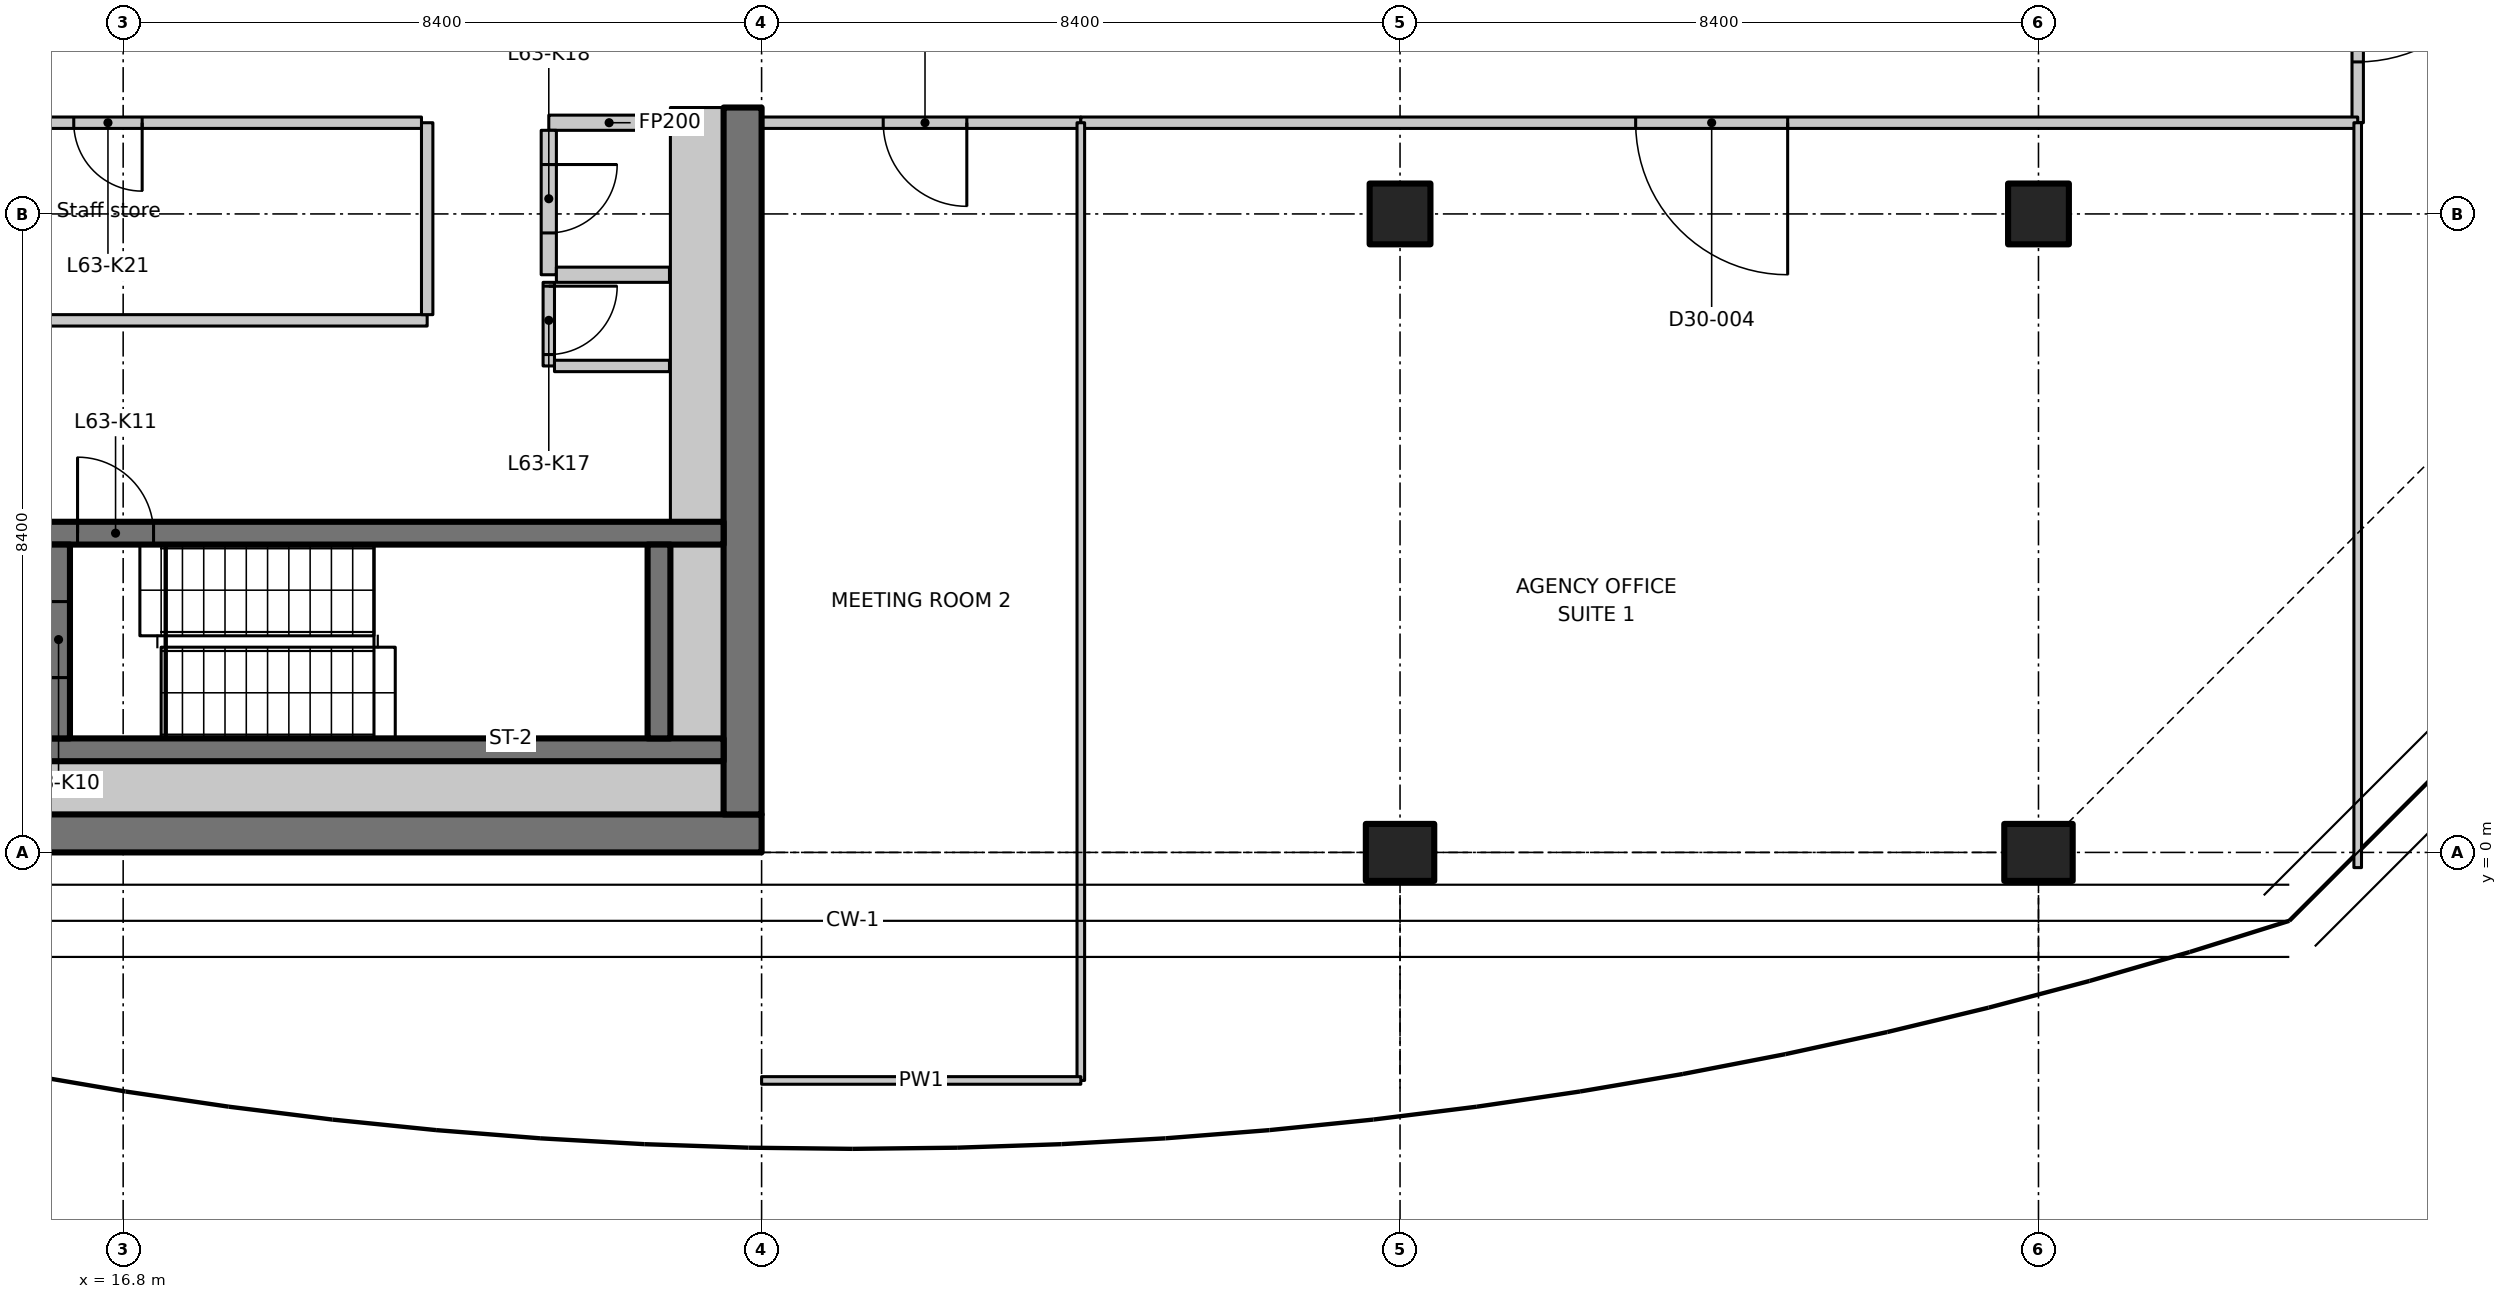
"""IFC4 building model, lengths in metres.
Left out: names, types, materials, properties, quantities, classifications, styles, units other than length and angle.
Written with IfcOpenShell. Run it as: python <this file> out.ifc"""

import sys

from ifc_helpers import new_model, si_unit, direction, frame, frame_2d, origin, origin_2d, place, context, subcontext, project, spatial, polyline, rectangle, outline, extrude, element, fill, save


model = new_model("IFC4")
c1 = context("Model", 3, precision=1e-05, world=origin(), true_north=direction((0.0, 1.0)))
c2 = subcontext(c1, "Body", "Model", "MODEL_VIEW")
j1 = project(units=[si_unit("LENGTHUNIT", "METRE"), si_unit("PLANEANGLEUNIT", "RADIAN")], contexts=[c1])
p1 = place(None, origin())
s1 = spatial("IfcSite", under=j1, at=p1, CompositionType="ELEMENT")
p2 = place(p1, origin())
s2 = spatial("IfcBuilding", under=s1, at=p2, CompositionType="ELEMENT")
p3 = place(p2, frame((0.0, 0.0, 248.1)))
s3 = spatial("IfcBuildingStorey", under=s2, at=p3, CompositionType="ELEMENT", Elevation=248.1)
p4 = place(p3, frame((33.6, 0.0, 0.0), z_axis=(0.0, 0.0, 1.0), x_axis=(0.0, 1.0, 0.0)))
e1 = element("IfcColumn", 1, at=p4, inside=s3, PredefinedType="COLUMN", context=c2, shape_type="SweptSolid", body=[
    extrude(rectangle(XDim=0.75, YDim=0.9, at=origin_2d()), origin(), (0.0, 0.0, 1.0), 3.35),
])
p5 = place(p3, frame((33.6, 8.4, 0.0), z_axis=(0.0, 0.0, 1.0), x_axis=(1.0, 0.0, 0.0)))
e2 = element("IfcColumn", 2, at=p5, inside=s3, PredefinedType="COLUMN", context=c2, shape_type="SweptSolid", body=[
    extrude(rectangle(XDim=0.8, YDim=0.8, at=origin_2d()), origin(), (0.0, 0.0, 1.0), 3.35),
])
p6 = place(p3, frame((42.0, 0.0, 0.0), z_axis=(0.0, 0.0, 1.0), x_axis=(0.0, 1.0, 0.0)))
e3 = element("IfcColumn", 3, at=p6, inside=s3, PredefinedType="COLUMN", context=c2, shape_type="SweptSolid", body=[
    extrude(rectangle(XDim=0.75, YDim=0.9, at=origin_2d()), origin(), (0.0, 0.0, 1.0), 3.35),
])
p7 = place(p3, frame((42.0, 8.4, 0.0), z_axis=(0.0, 0.0, 1.0), x_axis=(1.0, 0.0, 0.0)))
e4 = element("IfcColumn", 4, at=p7, inside=s3, PredefinedType="COLUMN", context=c2, shape_type="SweptSolid", body=[
    extrude(rectangle(XDim=0.8, YDim=0.8, at=origin_2d()), origin(), (0.0, 0.0, 1.0), 3.35),
])
p8 = place(p3, frame((7.436, 0.25, 0.0), z_axis=(0.0, 0.0, 1.0), x_axis=(1.0, 0.0, 0.0)))
e5 = element("IfcWall", 5, at=p8, inside=s3, PredefinedType="SHEAR", context=c2, shape_type="SweptSolid", body=[
    extrude(rectangle(XDim=17.764, YDim=0.5, at=frame_2d((8.882, 0.0))), origin(), (0.0, 0.0, 1.0), 3.35),
])
p9 = place(p3, frame((24.95, 0.5, 0.0), z_axis=(0.0, 0.0, 1.0), x_axis=(0.0, 1.0, 0.0)))
e6 = element("IfcWall", 6, at=p9, inside=s3, PredefinedType="SHEAR", context=c2, shape_type="SweptSolid", body=[
    extrude(rectangle(XDim=9.3, YDim=0.5, at=frame_2d((4.65, 0.0))), origin(), (0.0, 0.0, 1.0), 3.35),
])
p10 = place(p3, frame((15.8, 1.35, 0.0), z_axis=(0.0, 0.0, 1.0), x_axis=(1.0, 0.0, 0.0)))
e7 = element("IfcWall", 7, at=p10, inside=s3, PredefinedType="SHEAR", context=c2, shape_type="SweptSolid", body=[
    extrude(rectangle(XDim=8.9, YDim=0.3, at=frame_2d((4.45, 0.0))), origin(), (0.0, 0.0, 1.0), 3.35),
])
p11 = place(p3, frame((15.8, 4.2, 0.0), z_axis=(0.0, 0.0, 1.0), x_axis=(1.0, 0.0, 0.0)))
e8 = element("IfcWall", 8, at=p11, inside=s3, PredefinedType="SHEAR", context=c2, shape_type="SweptSolid", body=[
    extrude(rectangle(XDim=8.9, YDim=0.3, at=frame_2d((4.45, 0.0))), origin(), (0.0, 0.0, 1.0), 3.35),
])
p12 = place(p11, frame((0.4, 0.0, 0.0)))
e9 = element("IfcOpeningElement", 9, at=p12, cuts=e8, PredefinedType="OPENING", context=c2, shape_type="SweptSolid", body=[
    extrude(rectangle(XDim=1.0, YDim=2.1, at=frame_2d((0.5, 1.05))), frame((0.0, 0.16, 0.0), z_axis=(0.0, -1.0, 0.0), x_axis=(1.0, 0.0, 0.0)), (0.0, 0.0, 1.0), 0.32),
])
p13 = place(p3, frame((15.95, 1.5, 0.0), z_axis=(0.0, 0.0, 1.0), x_axis=(0.0, 1.0, 0.0)))
e10 = element("IfcWall", 10, at=p13, inside=s3, PredefinedType="SHEAR", context=c2, shape_type="SweptSolid", body=[
    extrude(rectangle(XDim=2.55, YDim=0.3, at=frame_2d((1.275, 0.0))), origin(), (0.0, 0.0, 1.0), 3.35),
])
p14 = place(p13, frame((0.8, 0.0, 0.0)))
e11 = element("IfcOpeningElement", 11, at=p14, cuts=e10, PredefinedType="OPENING", context=c2, shape_type="SweptSolid", body=[
    extrude(rectangle(XDim=1.0, YDim=2.1, at=frame_2d((0.5, 1.05))), frame((0.0, 0.16, 0.0), z_axis=(0.0, -1.0, 0.0), x_axis=(1.0, 0.0, 0.0)), (0.0, 0.0, 1.0), 0.32),
])
p15 = place(p3, frame((23.85, 1.5, 0.0), z_axis=(0.0, 0.0, 1.0), x_axis=(0.0, 1.0, 0.0)))
e12 = element("IfcWall", 12, at=p15, inside=s3, PredefinedType="SHEAR", context=c2, shape_type="SweptSolid", body=[
    extrude(rectangle(XDim=2.55, YDim=0.3, at=frame_2d((1.275, 0.0))), origin(), (0.0, 0.0, 1.0), 3.35),
])
p16 = place(p3, frame((23.988, 9.6, 0.0), z_axis=(0.0, 0.0, 1.0), x_axis=(-1.0, 0.0, 0.0)))
e13 = element("IfcWall", 13, at=p16, inside=s3, PredefinedType="PARTITIONING", context=c2, shape_type="SweptSolid", body=[
    extrude(rectangle(XDim=1.588, YDim=0.2, at=frame_2d((0.794, 0.0))), origin(), (0.0, 0.0, 1.0), 3.35),
])
p17 = place(p3, frame((22.4, 9.5, 0.0), z_axis=(0.0, 0.0, 1.0), x_axis=(0.0, -1.0, 0.0)))
e14 = element("IfcWall", 14, at=p17, inside=s3, PredefinedType="PARTITIONING", context=c2, shape_type="SweptSolid", body=[
    extrude(rectangle(XDim=1.9, YDim=0.2, at=frame_2d((0.95, 0.0))), origin(), (0.0, 0.0, 1.0), 3.35),
])
p18 = place(p17, frame((0.45, 0.0, 0.0)))
e15 = element("IfcOpeningElement", 15, at=p18, cuts=e14, PredefinedType="OPENING", context=c2, shape_type="SweptSolid", body=[
    extrude(rectangle(XDim=0.9, YDim=2.1, at=frame_2d((0.45, 1.05))), frame((0.0, 0.11, 0.0), z_axis=(0.0, -1.0, 0.0), x_axis=(1.0, 0.0, 0.0)), (0.0, 0.0, 1.0), 0.22),
])
p19 = place(p3, frame((22.5, 7.6, 0.0), z_axis=(0.0, 0.0, 1.0), x_axis=(1.0, 0.0, 0.0)))
e16 = element("IfcWall", 16, at=p19, inside=s3, PredefinedType="PARTITIONING", context=c2, shape_type="SweptSolid", body=[
    extrude(rectangle(XDim=1.488, YDim=0.2, at=frame_2d((0.744, 0.0))), origin(), (0.0, 0.0, 1.0), 3.35),
])
p20 = place(p3, frame((12.5, 7.0, 0.0), z_axis=(0.0, 0.0, 1.0), x_axis=(1.0, 0.0, 0.0)))
e17 = element("IfcWall", 17, at=p20, inside=s3, PredefinedType="PARTITIONING", context=c2, shape_type="SweptSolid", body=[
    extrude(rectangle(XDim=8.3, YDim=0.15, at=frame_2d((4.15, 0.0))), origin(), (0.0, 0.0, 1.0), 3.35),
])
p21 = place(p3, frame((20.8, 7.075, 0.0), z_axis=(0.0, 0.0, 1.0), x_axis=(0.0, 1.0, 0.0)))
e18 = element("IfcWall", 18, at=p21, inside=s3, PredefinedType="PARTITIONING", context=c2, shape_type="SweptSolid", body=[
    extrude(rectangle(XDim=2.525, YDim=0.15, at=frame_2d((1.263, 0.0))), origin(), (0.0, 0.0, 1.0), 3.35),
])
p22 = place(p3, frame((20.725, 9.6, 0.0), z_axis=(0.0, 0.0, 1.0), x_axis=(-1.0, 0.0, 0.0)))
e19 = element("IfcWall", 19, at=p22, inside=s3, PredefinedType="PARTITIONING", context=c2, shape_type="SweptSolid", body=[
    extrude(rectangle(XDim=8.225, YDim=0.15, at=frame_2d((4.113, 0.0))), origin(), (0.0, 0.0, 1.0), 3.35),
])
p23 = place(p22, frame((3.675, 0.0, 0.0)))
e20 = element("IfcOpeningElement", 20, at=p23, cuts=e19, PredefinedType="OPENING", context=c2, shape_type="SweptSolid", body=[
    extrude(rectangle(XDim=0.9, YDim=2.1, at=frame_2d((0.45, 1.05))), frame((0.0, 0.085, 0.0), z_axis=(0.0, -1.0, 0.0), x_axis=(1.0, 0.0, 0.0)), (0.0, 0.0, 1.0), 0.17),
])
p24 = place(p3, frame((22.4, 7.5, 0.0), z_axis=(0.0, 0.0, 1.0), x_axis=(0.0, -1.0, 0.0)))
e21 = element("IfcWall", 21, at=p24, inside=s3, PredefinedType="PARTITIONING", context=c2, shape_type="SweptSolid", body=[
    extrude(rectangle(XDim=1.1, YDim=0.15, at=frame_2d((0.55, 0.0))), origin(), (0.0, 0.0, 1.0), 3.35),
])
p25 = place(p24, frame((0.05, 0.0, 0.0)))
e22 = element("IfcOpeningElement", 22, at=p25, cuts=e21, PredefinedType="OPENING", context=c2, shape_type="SweptSolid", body=[
    extrude(rectangle(XDim=0.9, YDim=2.1, at=frame_2d((0.45, 1.05))), frame((0.0, 0.085, 0.0), z_axis=(0.0, -1.0, 0.0), x_axis=(1.0, 0.0, 0.0)), (0.0, 0.0, 1.0), 0.17),
])
p26 = place(p3, frame((22.475, 6.4, 0.0), z_axis=(0.0, 0.0, 1.0), x_axis=(1.0, 0.0, 0.0)))
e23 = element("IfcWall", 23, at=p26, inside=s3, PredefinedType="PARTITIONING", context=c2, shape_type="SweptSolid", body=[
    extrude(rectangle(XDim=1.513, YDim=0.15, at=frame_2d((0.756, 0.0))), origin(), (0.0, 0.0, 1.0), 3.35),
])
p27 = place(p3, frame((13.35, 0.85, 0.0), z_axis=(0.0, 0.0, 1.0), x_axis=(1.0, 0.0, 0.0)))
e24 = element("IfcWall", 24, at=p27, inside=s3, PredefinedType="PARTITIONING", context=c2, shape_type="SweptSolid", body=[
    extrude(rectangle(XDim=11.35, YDim=0.7, at=frame_2d((5.675, 0.0))), origin(), (0.0, 0.0, 1.0), 3.35),
])
p28 = place(p3, frame((24.35, 1.5, 0.0), z_axis=(0.0, 0.0, 1.0), x_axis=(0.0, 1.0, 0.0)))
e25 = element("IfcWall", 25, at=p28, inside=s3, PredefinedType="PARTITIONING", context=c2, shape_type="SweptSolid", body=[
    extrude(rectangle(XDim=2.55, YDim=0.7, at=frame_2d((1.275, 0.0))), origin(), (0.0, 0.0, 1.0), 3.35),
])
p29 = place(p3, frame((24.35, 4.35, 0.0), z_axis=(0.0, 0.0, 1.0), x_axis=(0.0, 1.0, 0.0)))
e26 = element("IfcWall", 26, at=p29, inside=s3, PredefinedType="PARTITIONING", context=c2, shape_type="SweptSolid", body=[
    extrude(rectangle(XDim=5.45, YDim=0.7, at=frame_2d((2.725, 0.0))), origin(), (0.0, 0.0, 1.0), 3.35),
])
p30 = place(p3, frame((29.4, 9.6, 0.0), z_axis=(0.0, 0.0, 1.0), x_axis=(-1.0, 0.0, 0.0)))
e27 = element("IfcWall", 27, at=p30, inside=s3, PredefinedType="PARTITIONING", context=c2, shape_type="SweptSolid", body=[
    extrude(rectangle(XDim=4.2, YDim=0.15, at=frame_2d((2.1, 0.0))), origin(), (0.0, 0.0, 1.0), 3.33),
])
p31 = place(p30, frame((1.5, 0.0, 0.0)))
e28 = element("IfcOpeningElement", 28, at=p31, cuts=e27, PredefinedType="OPENING", context=c2, shape_type="SweptSolid", body=[
    extrude(rectangle(XDim=1.1, YDim=2.1, at=frame_2d((0.55, 1.05))), frame((0.0, 0.085, 0.0), z_axis=(0.0, -1.0, 0.0), x_axis=(1.0, 0.0, 0.0)), (0.0, 0.0, 1.0), 0.17),
])
p32 = place(p3, frame((46.2, 13.0, 0.0), z_axis=(0.0, 0.0, 1.0), x_axis=(0.0, -1.0, 0.0)))
e29 = element("IfcWall", 29, at=p32, inside=s3, PredefinedType="PARTITIONING", context=c2, shape_type="SweptSolid", body=[
    extrude(rectangle(XDim=3.4, YDim=0.15, at=frame_2d((1.7, 0.0))), origin(), (0.0, 0.0, 1.0), 3.33),
])
p33 = place(p32, frame((0.6, 0.0, 0.0)))
e30 = element("IfcOpeningElement", 30, at=p33, cuts=e29, PredefinedType="OPENING", context=c2, shape_type="SweptSolid", body=[
    extrude(rectangle(XDim=2.0, YDim=2.4, at=frame_2d((1.0, 1.2))), frame((0.0, 0.085, 0.0), z_axis=(0.0, -1.0, 0.0), x_axis=(1.0, 0.0, 0.0)), (0.0, 0.0, 1.0), 0.17),
])
p34 = place(p3, frame((46.2, 9.6, 0.0), z_axis=(0.0, 0.0, 1.0), x_axis=(-1.0, 0.0, 0.0)))
e31 = element("IfcWall", 31, at=p34, inside=s3, PredefinedType="PARTITIONING", context=c2, shape_type="SweptSolid", body=[
    extrude(rectangle(XDim=16.8, YDim=0.15, at=frame_2d((8.4, 0.0))), origin(), (0.0, 0.0, 1.0), 3.33),
])
p35 = place(p34, frame((7.5, 0.0, 0.0)))
e32 = element("IfcOpeningElement", 32, at=p35, cuts=e31, PredefinedType="OPENING", context=c2, shape_type="SweptSolid", body=[
    extrude(rectangle(XDim=2.0, YDim=2.4, at=frame_2d((1.0, 1.2))), frame((0.0, 0.085, 0.0), z_axis=(0.0, -1.0, 0.0), x_axis=(1.0, 0.0, 0.0)), (0.0, 0.0, 1.0), 0.17),
])
p36 = place(p3, frame((46.2, -0.2, 0.0), z_axis=(0.0, 0.0, 1.0), x_axis=(0.0, 1.0, 0.0)))
e33 = element("IfcWall", 33, at=p36, inside=s3, PredefinedType="PARTITIONING", context=c2, shape_type="SweptSolid", body=[
    extrude(outline(polyline([(0.0, 0.0), (9.8, 0.0), (9.8, 3.33), (5.066, 3.33), (5.064, 2.98), (3.736, 2.98), (3.734, 3.33), (0.0, 3.33), (0.0, 0.0)])), frame((0.0, 0.05, 0.0), z_axis=(0.0, -1.0, 0.0), x_axis=(1.0, 0.0, 0.0)), (0.0, 0.0, 1.0), 0.1),
])
p37 = place(p3, frame((29.4, 9.6, 0.0), z_axis=(0.0, 0.0, 1.0), x_axis=(0.0, -1.0, 0.0)))
e34 = element("IfcWall", 34, at=p37, inside=s3, PredefinedType="PARTITIONING", context=c2, shape_type="SweptSolid", body=[
    extrude(outline(polyline([(0.0, 0.0), (12.6, 0.0), (12.6, 3.33), (10.05, 3.33), (10.048, 2.98), (9.152, 2.98), (9.15, 3.33), (0.0, 3.33), (0.0, 0.0)])), frame((0.0, 0.05, 0.0), z_axis=(0.0, -1.0, 0.0), x_axis=(1.0, 0.0, 0.0)), (0.0, 0.0, 1.0), 0.1),
])
p38 = place(p3, frame((29.4, -3.0, 0.0), z_axis=(0.0, 0.0, 1.0), x_axis=(-1.0, 0.0, 0.0)))
e35 = element("IfcWall", 35, at=p38, inside=s3, PredefinedType="PARTITIONING", context=c2, shape_type="SweptSolid", body=[
    extrude(rectangle(XDim=4.2, YDim=0.1, at=frame_2d((2.1, 0.0))), origin(), (0.0, 0.0, 1.0), 3.33),
])
p39 = place(p14, origin())
e36 = element("IfcDoor", 36, at=p39, inside=s3, OperationType="SINGLE_SWING_LEFT", PredefinedType="DOOR", context=c2, shape_type="SweptSolid", body=[
    extrude(rectangle(XDim=1.0, YDim=2.1, at=frame_2d((0.5, 1.05))), frame((0.0, 0.025, 0.0), z_axis=(0.0, -1.0, 0.0), x_axis=(1.0, 0.0, 0.0)), (0.0, 0.0, 1.0), 0.05),
])
fill(e11, e36)
p40 = place(p12, origin())
e37 = element("IfcDoor", 37, at=p40, inside=s3, OperationType="SINGLE_SWING_RIGHT", PredefinedType="DOOR", context=c2, shape_type="SweptSolid", body=[
    extrude(rectangle(XDim=1.0, YDim=2.1, at=frame_2d((0.5, 1.05))), frame((0.0, 0.025, 0.0), z_axis=(0.0, -1.0, 0.0), x_axis=(1.0, 0.0, 0.0)), (0.0, 0.0, 1.0), 0.05),
])
fill(e9, e37)
p41 = place(p25, origin())
e38 = element("IfcDoor", 38, at=p41, inside=s3, OperationType="SINGLE_SWING_RIGHT", PredefinedType="DOOR", context=c2, shape_type="SweptSolid", body=[
    extrude(rectangle(XDim=0.9, YDim=2.1, at=frame_2d((0.45, 1.05))), frame((0.0, 0.025, 0.0), z_axis=(0.0, -1.0, 0.0), x_axis=(1.0, 0.0, 0.0)), (0.0, 0.0, 1.0), 0.05),
])
fill(e22, e38)
p42 = place(p18, origin())
e39 = element("IfcDoor", 39, at=p42, inside=s3, OperationType="SINGLE_SWING_LEFT", PredefinedType="DOOR", context=c2, shape_type="SweptSolid", body=[
    extrude(rectangle(XDim=0.9, YDim=2.1, at=frame_2d((0.45, 1.05))), frame((0.0, 0.025, 0.0), z_axis=(0.0, -1.0, 0.0), x_axis=(1.0, 0.0, 0.0)), (0.0, 0.0, 1.0), 0.05),
])
fill(e15, e39)
p43 = place(p23, origin())
e40 = element("IfcDoor", 40, at=p43, inside=s3, OperationType="SINGLE_SWING_RIGHT", PredefinedType="DOOR", context=c2, shape_type="SweptSolid", body=[
    extrude(rectangle(XDim=0.9, YDim=2.1, at=frame_2d((0.45, 1.05))), frame((0.0, 0.025, 0.0), z_axis=(0.0, -1.0, 0.0), x_axis=(1.0, 0.0, 0.0)), (0.0, 0.0, 1.0), 0.05),
])
fill(e20, e40)
p44 = place(p33, origin())
e41 = element("IfcDoor", 41, at=p44, inside=s3, OperationType="DOUBLE_DOOR_SINGLE_SWING", PredefinedType="DOOR", context=c2, shape_type="SweptSolid", body=[
    extrude(rectangle(XDim=2.0, YDim=2.4, at=frame_2d((1.0, 1.2))), frame((0.0, 0.025, 0.0), z_axis=(0.0, -1.0, 0.0), x_axis=(1.0, 0.0, 0.0)), (0.0, 0.0, 1.0), 0.05),
])
fill(e30, e41)
p45 = place(p31, origin())
e42 = element("IfcDoor", 42, at=p45, inside=s3, OperationType="SINGLE_SWING_LEFT", PredefinedType="DOOR", context=c2, shape_type="SweptSolid", body=[
    extrude(rectangle(XDim=1.1, YDim=2.1, at=frame_2d((0.55, 1.05))), frame((0.0, 0.025, 0.0), z_axis=(0.0, -1.0, 0.0), x_axis=(1.0, 0.0, 0.0)), (0.0, 0.0, 1.0), 0.05),
])
fill(e28, e42)
p46 = place(p35, origin())
e43 = element("IfcDoor", 43, at=p46, inside=s3, OperationType="DOUBLE_DOOR_SINGLE_SWING", PredefinedType="DOOR", context=c2, shape_type="SweptSolid", body=[
    extrude(rectangle(XDim=2.0, YDim=2.4, at=frame_2d((1.0, 1.2))), frame((0.0, 0.025, 0.0), z_axis=(0.0, -1.0, 0.0), x_axis=(1.0, 0.0, 0.0)), (0.0, 0.0, 1.0), 0.05),
])
fill(e32, e43)
save(model, sys.argv[1])
